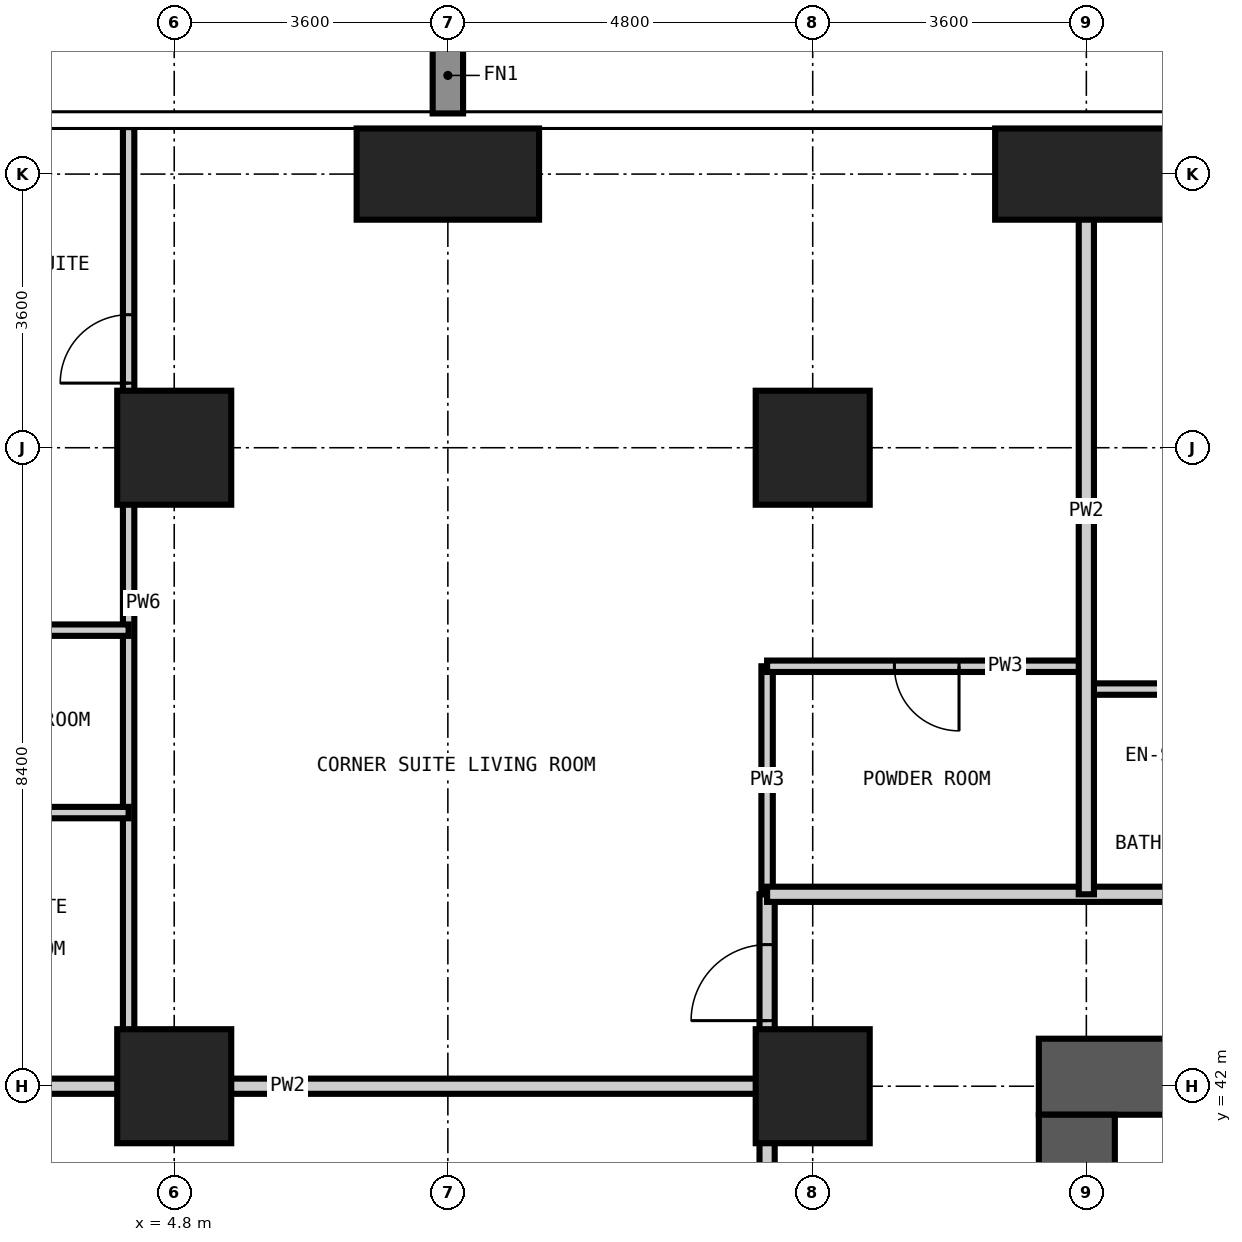
"""IFC4 building model, lengths in metres.
Left out: names, types, materials, properties, quantities, classifications, styles, units other than length and angle.
Written with IfcOpenShell. Run it as: python <this file> out.ifc"""

import sys

from ifc_helpers import new_model, si_unit, direction, frame, frame_2d, origin, origin_2d, place, context, subcontext, project, spatial, rectangle, extrude, element, fill, save


model = new_model("IFC4")
c1 = context("Model", 3, precision=1e-05, world=origin(), true_north=direction((0.0, 1.0)))
c2 = subcontext(c1, "Body", "Model", "MODEL_VIEW")
j1 = project(units=[si_unit("LENGTHUNIT", "METRE"), si_unit("PLANEANGLEUNIT", "RADIAN")], contexts=[c1])
p1 = place(None, origin())
s1 = spatial("IfcSite", under=j1, at=p1, CompositionType="ELEMENT")
p2 = place(p1, origin())
s2 = spatial("IfcBuilding", under=s1, at=p2, CompositionType="ELEMENT")
p3 = place(p2, frame((0.0, 0.0, 118.8)))
s3 = spatial("IfcBuildingStorey", under=s2, at=p3, CompositionType="ELEMENT", Elevation=118.8)
for number, where, z_axis, x_axis in (
    (1, (4.8, 42.0, -0.35), (0.0, 0.0, 1.0), (1.0, 0.0, 0.0)),
    (2, (4.8, 50.4, -0.35), (0.0, 0.0, 1.0), (1.0, 0.0, 0.0)),
):
    element("IfcColumn", number, at=place(p3, frame(where, z_axis=z_axis, x_axis=x_axis)), inside=s3, PredefinedType="COLUMN", context=c2, shape_type="SweptSolid", body=[
        extrude(rectangle(XDim=1.5, YDim=1.5, at=origin_2d()), origin(), (0.0, 0.0, 1.0), 3.6),
    ])
p4 = place(p3, frame((8.4, 54.0, -0.35), z_axis=(0.0, 0.0, 1.0), x_axis=(1.0, 0.0, 0.0)))
e3 = element("IfcColumn", 3, at=p4, inside=s3, PredefinedType="COLUMN", context=c2, shape_type="SweptSolid", body=[
    extrude(rectangle(XDim=2.4, YDim=1.2, at=origin_2d()), origin(), (0.0, 0.0, 1.0), 3.6),
])
for number, where, z_axis, x_axis in (
    (4, (13.2, 42.0, -0.35), (0.0, 0.0, 1.0), (1.0, 0.0, 0.0)),
    (5, (13.2, 50.4, -0.35), (0.0, 0.0, 1.0), (1.0, 0.0, 0.0)),
):
    element("IfcColumn", number, at=place(p3, frame(where, z_axis=z_axis, x_axis=x_axis)), inside=s3, PredefinedType="COLUMN", context=c2, shape_type="SweptSolid", body=[
        extrude(rectangle(XDim=1.5, YDim=1.5, at=origin_2d()), origin(), (0.0, 0.0, 1.0), 3.6),
    ])
p5 = place(p3, frame((16.8, 54.0, -0.35), z_axis=(0.0, 0.0, 1.0), x_axis=(1.0, 0.0, 0.0)))
e6 = element("IfcColumn", 6, at=p5, inside=s3, PredefinedType="COLUMN", context=c2, shape_type="SweptSolid", body=[
    extrude(rectangle(XDim=2.4, YDim=1.2, at=origin_2d()), origin(), (0.0, 0.0, 1.0), 3.6),
])
p6 = place(p3, frame((42.625, 42.125, -0.35), z_axis=(0.0, 0.0, 1.0), x_axis=(-1.0, 0.0, 0.0)))
e7 = element("IfcWall", 7, at=p6, inside=s3, PredefinedType="SHEAR", context=c2, shape_type="SweptSolid", body=[
    extrude(rectangle(XDim=26.45, YDim=1.0, at=frame_2d((13.225, 0.0))), origin(), (0.0, 0.0, 1.0), 3.6),
])
p7 = place(p6, frame((21.125, 0.0, 0.35)))
e8 = element("IfcOpeningElement", 8, at=p7, cuts=e7, PredefinedType="OPENING", context=c2, shape_type="SweptSolid", body=[
    extrude(rectangle(XDim=1.0, YDim=2.1, at=frame_2d((0.5, 1.05))), frame((0.0, 0.51, 0.0), z_axis=(0.0, -1.0, 0.0), x_axis=(1.0, 0.0, 0.0)), (0.0, 0.0, 1.0), 1.02),
])
p8 = place(p6, frame((10.525, 0.0, 0.35)))
e9 = element("IfcOpeningElement", 9, at=p8, cuts=e7, PredefinedType="OPENING", context=c2, shape_type="SweptSolid", body=[
    extrude(rectangle(XDim=1.2, YDim=2.2, at=frame_2d((0.6, 1.1))), frame((0.0, 0.51, 0.0), z_axis=(0.0, -1.0, 0.0), x_axis=(1.0, 0.0, 0.0)), (0.0, 0.0, 1.0), 1.02),
])
p9 = place(p3, frame((16.675, 41.625, -0.35), z_axis=(0.0, 0.0, 1.0), x_axis=(0.0, -1.0, 0.0)))
e10 = element("IfcWall", 10, at=p9, inside=s3, PredefinedType="SHEAR", context=c2, shape_type="SweptSolid", body=[
    extrude(rectangle(XDim=24.45, YDim=1.0, at=frame_2d((12.225, 0.0))), origin(), (0.0, 0.0, 1.0), 3.6),
])
p10 = place(p9, frame((11.325, 0.0, 0.35)))
e11 = element("IfcOpeningElement", 11, at=p10, cuts=e10, PredefinedType="OPENING", context=c2, shape_type="SweptSolid", body=[
    extrude(rectangle(XDim=1.8, YDim=2.2, at=frame_2d((0.9, 1.1))), frame((0.0, 0.51, 0.0), z_axis=(0.0, -1.0, 0.0), x_axis=(1.0, 0.0, 0.0)), (0.0, 0.0, 1.0), 1.02),
])
p11 = place(p9, frame((20.125, 0.0, 0.35)))
e12 = element("IfcOpeningElement", 12, at=p11, cuts=e10, PredefinedType="OPENING", context=c2, shape_type="SweptSolid", body=[
    extrude(rectangle(XDim=1.0, YDim=2.1, at=frame_2d((0.5, 1.05))), frame((0.0, 0.51, 0.0), z_axis=(0.0, -1.0, 0.0), x_axis=(1.0, 0.0, 0.0)), (0.0, 0.0, 1.0), 1.02),
])
p12 = place(p9, frame((5.425, 0.0, 0.35)))
e13 = element("IfcOpeningElement", 13, at=p12, cuts=e10, PredefinedType="OPENING", context=c2, shape_type="SweptSolid", body=[
    extrude(rectangle(XDim=1.0, YDim=2.1, at=frame_2d((0.5, 1.05))), frame((0.0, 0.51, 0.0), z_axis=(0.0, -1.0, 0.0), x_axis=(1.0, 0.0, 0.0)), (0.0, 0.0, 1.0), 1.02),
])
p13 = place(p3, frame((12.6, 44.525, 0.0), z_axis=(0.0, 0.0, 1.0), x_axis=(0.0, 1.0, 0.0)))
e14 = element("IfcWall", 14, at=p13, inside=s3, PredefinedType="PARTITIONING", context=c2, shape_type="SweptSolid", body=[
    extrude(rectangle(XDim=3.0, YDim=0.15, at=frame_2d((1.5, 0.0))), origin(), (0.0, 0.0, 1.0), 3.25),
])
p14 = place(p3, frame((16.8, 47.225, 0.0), z_axis=(0.0, 0.0, 1.0), x_axis=(1.0, 0.0, 0.0)))
e15 = element("IfcWall", 15, at=p14, inside=s3, PredefinedType="PARTITIONING", context=c2, shape_type="SweptSolid", body=[
    extrude(rectangle(XDim=2.4, YDim=0.15, at=frame_2d((1.2, 0.0))), origin(), (0.0, 0.0, 1.0), 3.25),
])
p15 = place(p3, frame((12.6, 47.525, 0.0), z_axis=(0.0, 0.0, 1.0), x_axis=(1.0, 0.0, 0.0)))
e16 = element("IfcWall", 16, at=p15, inside=s3, PredefinedType="PARTITIONING", context=c2, shape_type="SweptSolid", body=[
    extrude(rectangle(XDim=4.2, YDim=0.15, at=frame_2d((2.1, 0.0))), origin(), (0.0, 0.0, 1.0), 3.25),
])
p16 = place(p15, frame((1.675, 0.0, 0.0)))
e17 = element("IfcOpeningElement", 17, at=p16, cuts=e16, PredefinedType="OPENING", context=c2, shape_type="SweptSolid", body=[
    extrude(rectangle(XDim=0.85, YDim=2.1, at=frame_2d((0.425, 1.05))), frame((0.0, 0.085, 0.0), z_axis=(0.0, -1.0, 0.0), x_axis=(1.0, 0.0, 0.0)), (0.0, 0.0, 1.0), 0.17),
])
p17 = place(p3, frame((12.6, 13.075, 0.0), z_axis=(0.0, 0.0, 1.0), x_axis=(0.0, 1.0, 0.0)))
e18 = element("IfcWall", 18, at=p17, inside=s3, PredefinedType="PARTITIONING", context=c2, shape_type="SweptSolid", body=[
    extrude(rectangle(XDim=31.45, YDim=0.2, at=frame_2d((15.725, 0.0))), origin(), (0.0, 0.0, 1.0), 3.25),
])
p18 = place(p17, frame((8.625, 0.0, 0.0)))
e19 = element("IfcOpeningElement", 19, at=p18, cuts=e18, PredefinedType="OPENING", context=c2, shape_type="SweptSolid", body=[
    extrude(rectangle(XDim=1.0, YDim=2.2, at=frame_2d((0.5, 1.1))), frame((0.0, 0.11, 0.0), z_axis=(0.0, -1.0, 0.0), x_axis=(1.0, 0.0, 0.0)), (0.0, 0.0, 1.0), 0.22),
])
p19 = place(p17, frame((17.025, 0.0, 0.0)))
e20 = element("IfcOpeningElement", 20, at=p19, cuts=e18, PredefinedType="OPENING", context=c2, shape_type="SweptSolid", body=[
    extrude(rectangle(XDim=1.0, YDim=2.2, at=frame_2d((0.5, 1.1))), frame((0.0, 0.11, 0.0), z_axis=(0.0, -1.0, 0.0), x_axis=(1.0, 0.0, 0.0)), (0.0, 0.0, 1.0), 0.22),
])
p20 = place(p17, frame((25.425, 0.0, 0.0)))
e21 = element("IfcOpeningElement", 21, at=p20, cuts=e18, PredefinedType="OPENING", context=c2, shape_type="SweptSolid", body=[
    extrude(rectangle(XDim=1.0, YDim=2.2, at=frame_2d((0.5, 1.1))), frame((0.0, 0.11, 0.0), z_axis=(0.0, -1.0, 0.0), x_axis=(1.0, 0.0, 0.0)), (0.0, 0.0, 1.0), 0.22),
])
p21 = place(p17, frame((1.363, 0.0, 0.0)))
e22 = element("IfcOpeningElement", 22, at=p21, cuts=e18, PredefinedType="OPENING", context=c2, shape_type="SweptSolid", body=[
    extrude(rectangle(XDim=1.0, YDim=2.2, at=frame_2d((0.5, 1.1))), frame((0.0, 0.11, 0.0), z_axis=(0.0, -1.0, 0.0), x_axis=(1.0, 0.0, 0.0)), (0.0, 0.0, 1.0), 0.22),
])
p22 = place(p17, frame((29.788, 0.0, 0.0)))
e23 = element("IfcOpeningElement", 23, at=p22, cuts=e18, PredefinedType="OPENING", context=c2, shape_type="SweptSolid", body=[
    extrude(rectangle(XDim=1.0, YDim=2.2, at=frame_2d((0.5, 1.1))), frame((0.0, 0.11, 0.0), z_axis=(0.0, -1.0, 0.0), x_axis=(1.0, 0.0, 0.0)), (0.0, 0.0, 1.0), 0.22),
])
p23 = place(p3, frame((12.6, 44.525, 0.0), z_axis=(0.0, 0.0, 1.0), x_axis=(1.0, 0.0, 0.0)))
e24 = element("IfcWall", 24, at=p23, inside=s3, PredefinedType="PARTITIONING", context=c2, shape_type="SweptSolid", body=[
    extrude(rectangle(XDim=32.525, YDim=0.2, at=frame_2d((16.262, 0.0))), origin(), (0.0, 0.0, 1.0), 3.25),
])
p24 = place(p23, frame((9.1, 0.0, 0.0)))
e25 = element("IfcOpeningElement", 25, at=p24, cuts=e24, PredefinedType="OPENING", context=c2, shape_type="SweptSolid", body=[
    extrude(rectangle(XDim=1.0, YDim=2.2, at=frame_2d((0.5, 1.1))), frame((0.0, 0.11, 0.0), z_axis=(0.0, -1.0, 0.0), x_axis=(1.0, 0.0, 0.0)), (0.0, 0.0, 1.0), 0.22),
])
p25 = place(p23, frame((17.5, 0.0, 0.0)))
e26 = element("IfcOpeningElement", 26, at=p25, cuts=e24, PredefinedType="OPENING", context=c2, shape_type="SweptSolid", body=[
    extrude(rectangle(XDim=1.0, YDim=2.2, at=frame_2d((0.5, 1.1))), frame((0.0, 0.11, 0.0), z_axis=(0.0, -1.0, 0.0), x_axis=(1.0, 0.0, 0.0)), (0.0, 0.0, 1.0), 0.22),
])
p26 = place(p23, frame((25.9, 0.0, 0.0)))
e27 = element("IfcOpeningElement", 27, at=p26, cuts=e24, PredefinedType="OPENING", context=c2, shape_type="SweptSolid", body=[
    extrude(rectangle(XDim=1.0, YDim=2.2, at=frame_2d((0.5, 1.1))), frame((0.0, 0.11, 0.0), z_axis=(0.0, -1.0, 0.0), x_axis=(1.0, 0.0, 0.0)), (0.0, 0.0, 1.0), 0.22),
])
p27 = place(p3, frame((16.8, 44.525, 0.0), z_axis=(0.0, 0.0, 1.0), x_axis=(0.0, 1.0, 0.0)))
e28 = element("IfcWall", 28, at=p27, inside=s3, PredefinedType="PARTITIONING", context=c2, shape_type="SweptSolid", body=[
    extrude(rectangle(XDim=10.093, YDim=0.2, at=frame_2d((5.046, 0.0))), origin(), (0.0, 0.0, 1.0), 3.25),
])
p28 = place(p3, frame((-0.018, 42.0, 0.0), z_axis=(0.0, 0.0, 1.0), x_axis=(1.0, 0.0, 0.0)))
e29 = element("IfcWall", 29, at=p28, inside=s3, PredefinedType="PARTITIONING", context=c2, shape_type="SweptSolid", body=[
    extrude(rectangle(XDim=12.618, YDim=0.2, at=frame_2d((6.309, 0.0))), origin(), (0.0, 0.0, 1.0), 3.25),
])
p29 = place(p3, frame((4.2, 42.0, 0.0), z_axis=(0.0, 0.0, 1.0), x_axis=(0.0, 1.0, 0.0)))
e30 = element("IfcWall", 30, at=p29, inside=s3, PredefinedType="PARTITIONING", context=c2, shape_type="SweptSolid", body=[
    extrude(rectangle(XDim=12.618, YDim=0.15, at=frame_2d((6.309, 0.0))), origin(), (0.0, 0.0, 1.0), 3.25),
])
p30 = place(p29, frame((9.25, 0.0, 0.0)))
e31 = element("IfcOpeningElement", 31, at=p30, cuts=e30, PredefinedType="OPENING", context=c2, shape_type="SweptSolid", body=[
    extrude(rectangle(XDim=0.9, YDim=2.1, at=frame_2d((0.45, 1.05))), frame((0.0, 0.085, 0.0), z_axis=(0.0, -1.0, 0.0), x_axis=(1.0, 0.0, 0.0)), (0.0, 0.0, 1.0), 0.17),
])
p31 = place(p3, frame((1.2, 45.6, 0.0), z_axis=(0.0, 0.0, 1.0), x_axis=(1.0, 0.0, 0.0)))
e32 = element("IfcWall", 32, at=p31, inside=s3, PredefinedType="PARTITIONING", context=c2, shape_type="SweptSolid", body=[
    extrude(rectangle(XDim=3.0, YDim=0.15, at=frame_2d((1.5, 0.0))), origin(), (0.0, 0.0, 1.0), 3.25),
])
p32 = place(p3, frame((1.2, 48.0, 0.0), z_axis=(0.0, 0.0, 1.0), x_axis=(1.0, 0.0, 0.0)))
e33 = element("IfcWall", 33, at=p32, inside=s3, PredefinedType="PARTITIONING", context=c2, shape_type="SweptSolid", body=[
    extrude(rectangle(XDim=3.0, YDim=0.15, at=frame_2d((1.5, 0.0))), origin(), (0.0, 0.0, 1.0), 3.25),
])
p33 = place(p32, frame((1.05, 0.0, 0.0)))
e34 = element("IfcOpeningElement", 34, at=p33, cuts=e33, PredefinedType="OPENING", context=c2, shape_type="SweptSolid", body=[
    extrude(rectangle(XDim=0.9, YDim=2.1, at=frame_2d((0.45, 1.05))), frame((0.0, 0.085, 0.0), z_axis=(0.0, -1.0, 0.0), x_axis=(1.0, 0.0, 0.0)), (0.0, 0.0, 1.0), 0.17),
])
p34 = place(p22, origin())
e35 = element("IfcDoor", 35, at=p34, inside=s3, OperationType="SINGLE_SWING_LEFT", PredefinedType="DOOR", context=c2, shape_type="SweptSolid", body=[
    extrude(rectangle(XDim=1.0, YDim=2.2, at=frame_2d((0.5, 1.1))), frame((0.0, 0.025, 0.0), z_axis=(0.0, -1.0, 0.0), x_axis=(1.0, 0.0, 0.0)), (0.0, 0.0, 1.0), 0.05),
])
fill(e23, e35)
p35 = place(p16, frame((0.85, 0.0, 0.0), z_axis=(0.0, 0.0, 1.0), x_axis=(-1.0, 0.0, 0.0)))
e36 = element("IfcDoor", 36, at=p35, inside=s3, OperationType="SINGLE_SWING_LEFT", PredefinedType="DOOR", context=c2, shape_type="SweptSolid", body=[
    extrude(rectangle(XDim=0.85, YDim=2.1, at=frame_2d((0.425, 1.05))), frame((0.0, 0.025, 0.0), z_axis=(0.0, -1.0, 0.0), x_axis=(1.0, 0.0, 0.0)), (0.0, 0.0, 1.0), 0.05),
])
fill(e17, e36)
p36 = place(p30, origin())
e37 = element("IfcDoor", 37, at=p36, inside=s3, OperationType="SINGLE_SWING_LEFT", PredefinedType="DOOR", context=c2, shape_type="SweptSolid", body=[
    extrude(rectangle(XDim=0.9, YDim=2.1, at=frame_2d((0.45, 1.05))), frame((0.0, 0.025, 0.0), z_axis=(0.0, -1.0, 0.0), x_axis=(1.0, 0.0, 0.0)), (0.0, 0.0, 1.0), 0.05),
])
fill(e31, e37)
save(model, sys.argv[1])
